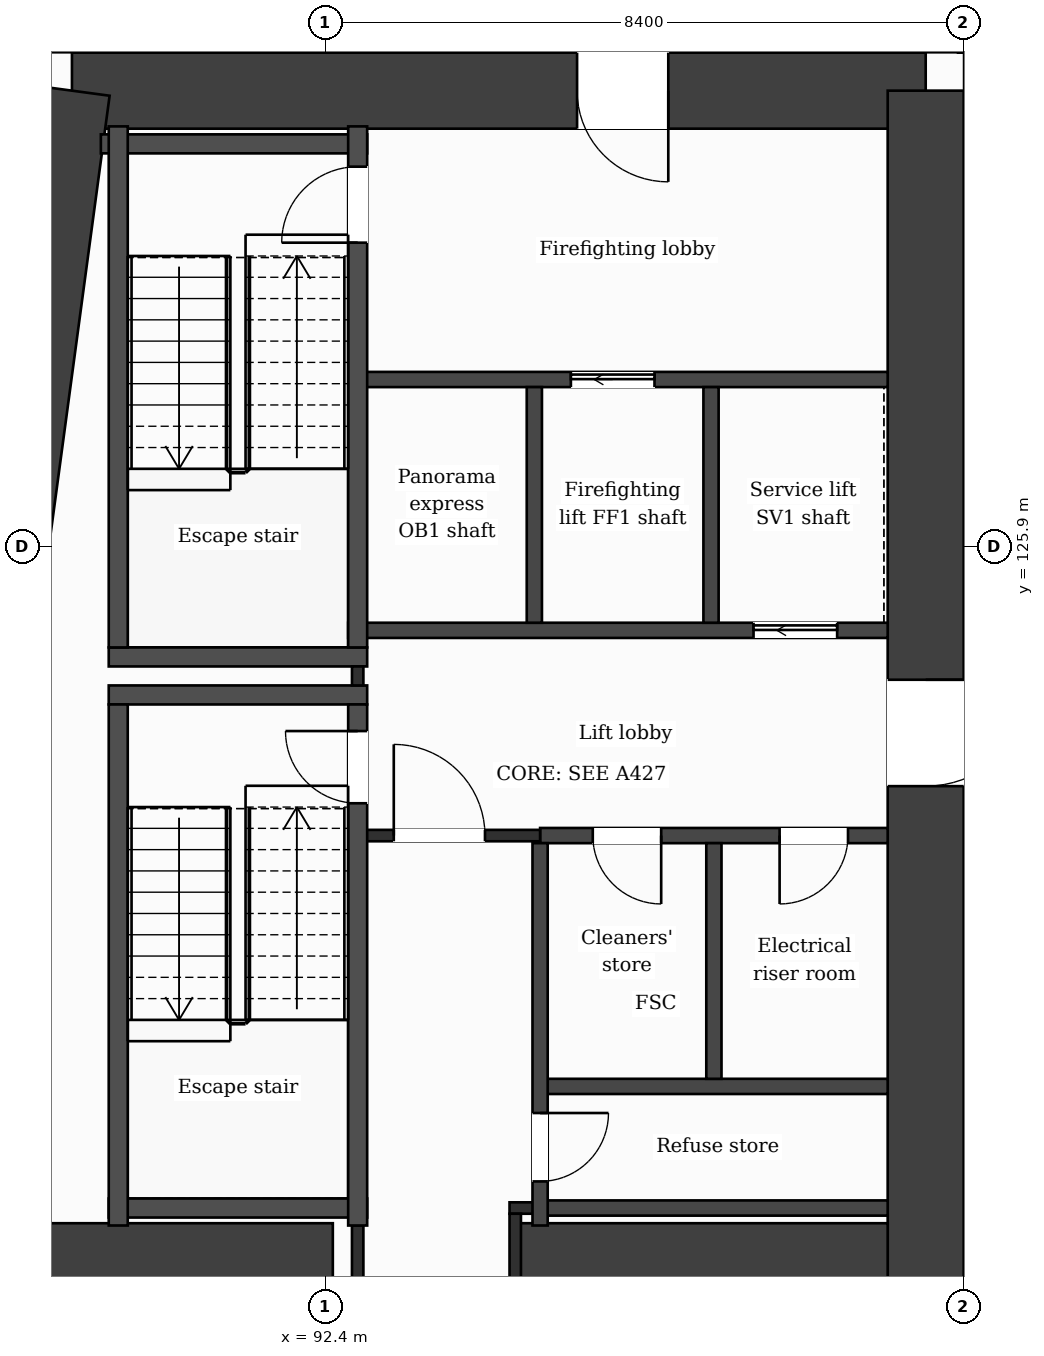
"""IFC4 building model, lengths in metres.
Left out: names, types, materials, properties, quantities, classifications, styles, units other than length and angle.
Written with IfcOpenShell. Run it as: python <this file> out.ifc"""

import sys

from ifc_helpers import new_model, si_unit, direction, frame, frame_2d, origin, place, context, subcontext, project, spatial, rectangle, extrude, element, fill, save


model = new_model("IFC4")
c1 = context("Model", 3, precision=1e-05, world=origin(), true_north=direction((0.0, 1.0)))
c2 = subcontext(c1, "Body", "Model", "MODEL_VIEW")
j1 = project(units=[si_unit("LENGTHUNIT", "METRE"), si_unit("PLANEANGLEUNIT", "RADIAN")], contexts=[c1])
p1 = place(None, origin())
s1 = spatial("IfcSite", under=j1, at=p1, CompositionType="ELEMENT")
p2 = place(p1, origin())
s2 = spatial("IfcBuilding", under=s1, at=p2, CompositionType="ELEMENT")
p3 = place(p2, frame((0.0, 0.0, 113.2)))
s3 = spatial("IfcBuildingStorey", under=s2, at=p3, CompositionType="ELEMENT", Elevation=113.2)
p4 = place(p3, frame((89.068, 131.9, 0.0), z_axis=(0.0, 0.0, 1.0), x_axis=(1.0, 0.0, 0.0)))
e1 = element("IfcWall", 1, at=p4, inside=s3, PredefinedType="SHEAR", context=c2, shape_type="SweptSolid", body=[
    extrude(rectangle(XDim=11.232, YDim=1.0, at=frame_2d((5.616, 0.0))), origin(), (0.0, 0.0, 1.0), 3.7),
])
p5 = place(p4, frame((6.646, 0.0, 0.0)))
e2 = element("IfcOpeningElement", 2, at=p5, cuts=e1, PredefinedType="OPENING", context=c2, shape_type="SweptSolid", body=[
    extrude(rectangle(XDim=1.2, YDim=2.1, at=frame_2d((0.6, 1.05))), frame((0.0, 0.51, 0.0), z_axis=(0.0, -1.0, 0.0), x_axis=(1.0, 0.0, 0.0)), (0.0, 0.0, 1.0), 1.02),
])
p6 = place(p3, frame((100.3, 131.9, 0.0), z_axis=(0.0, 0.0, 1.0), x_axis=(0.0, -1.0, 0.0)))
e3 = element("IfcWall", 3, at=p6, inside=s3, PredefinedType="SHEAR", context=c2, shape_type="SweptSolid", body=[
    extrude(rectangle(XDim=21.0, YDim=1.0, at=frame_2d((10.5, 0.0))), origin(), (0.0, 0.0, 1.0), 3.7),
])
p7 = place(p6, frame((7.75, 0.0, 0.0)))
e4 = element("IfcOpeningElement", 4, at=p7, cuts=e3, PredefinedType="OPENING", context=c2, shape_type="SweptSolid", body=[
    extrude(rectangle(XDim=1.4, YDim=2.1, at=frame_2d((0.7, 1.05))), frame((0.0, 0.51, 0.0), z_axis=(0.0, -1.0, 0.0), x_axis=(1.0, 0.0, 0.0)), (0.0, 0.0, 1.0), 1.02),
])
p8 = place(p3, frame((86.241, 110.9, 0.0), z_axis=(0.0, 0.0, 1.0), x_axis=(0.133411141623, 0.991060778808, 0.0)))
e5 = element("IfcWall", 5, at=p8, inside=s3, PredefinedType="SHEAR", context=c2, shape_type="SweptSolid", body=[
    extrude(rectangle(XDim=21.189, YDim=1.0, at=frame_2d((10.595, 0.0))), origin(), (0.0, 0.0, 1.0), 3.7),
])
p9 = place(p3, frame((87.423, 116.5, 0.0), z_axis=(0.0, 0.0, 1.0), x_axis=(1.0, 0.0, 0.0)))
e6 = element("IfcWall", 6, at=p9, inside=s3, PredefinedType="SHEAR", context=c2, shape_type="SweptSolid", body=[
    extrude(rectangle(XDim=5.077, YDim=1.0, at=frame_2d((2.539, 0.0))), origin(), (0.0, 0.0, 1.0), 3.7),
])
p10 = place(p3, frame((94.9, 116.5, 0.0), z_axis=(0.0, 0.0, 1.0), x_axis=(1.0, 0.0, 0.0)))
e7 = element("IfcWall", 7, at=p10, inside=s3, PredefinedType="SHEAR", context=c2, shape_type="SweptSolid", body=[
    extrude(rectangle(XDim=4.9, YDim=1.0, at=frame_2d((2.45, 0.0))), origin(), (0.0, 0.0, 1.0), 3.7),
])
p11 = place(p3, frame((91.177, 138.95, 0.0), z_axis=(0.0, 0.0, 1.0), x_axis=(-0.133426664613, -0.991058689065, 0.0)))
e8 = element("IfcWall", 8, at=p11, inside=s3, PredefinedType="SOLIDWALL", context=c2, shape_type="SweptSolid", body=[
    extrude(rectangle(XDim=6.609, YDim=0.3, at=frame_2d((3.305, 0.0))), origin(), (0.0, 0.0, 1.0), 3.38),
])
p12 = place(p11, frame((1.039, 0.0, 0.9)))
e9 = element("IfcOpeningElement", 9, at=p12, cuts=e8, PredefinedType="OPENING", context=c2, shape_type="SweptSolid", body=[
    extrude(rectangle(XDim=1.2, YDim=2.1, at=frame_2d((0.6, 1.05))), frame((0.0, 0.16, 0.0), z_axis=(0.0, -1.0, 0.0), x_axis=(1.0, 0.0, 0.0)), (0.0, 0.0, 1.0), 0.32),
])
p13 = place(p11, frame((4.294, 0.0, 0.0)))
e10 = element("IfcOpeningElement", 10, at=p13, cuts=e8, PredefinedType="OPENING", context=c2, shape_type="SweptSolid", body=[
    extrude(rectangle(XDim=1.2, YDim=2.4, at=frame_2d((0.6, 1.2))), frame((0.0, 0.16, 0.0), z_axis=(0.0, -1.0, 0.0), x_axis=(1.0, 0.0, 0.0)), (0.0, 0.0, 1.0), 0.32),
])
p14 = place(p3, frame((95.227, 117.2, 0.0), z_axis=(0.0, 0.0, 1.0), x_axis=(1.0, 0.0, 0.0)))
e11 = element("IfcWall", 11, at=p14, inside=s3, PredefinedType="PARTITIONING", context=c2, shape_type="SweptSolid", body=[
    extrude(rectangle(XDim=4.573, YDim=0.2, at=frame_2d((2.287, 0.0))), origin(), (0.0, 0.0, 1.0), 3.38),
])
p15 = place(p3, frame((94.825, 117.2, 0.0), z_axis=(0.0, 0.0, 1.0), x_axis=(1.0, 0.0, 0.0)))
e12 = element("IfcWall", 12, at=p15, inside=s3, PredefinedType="PARTITIONING", context=c2, shape_type="SweptSolid", body=[
    extrude(rectangle(XDim=0.402, YDim=0.15, at=frame_2d((0.201, 0.0))), origin(), (0.0, 0.0, 1.0), 3.38),
])
p16 = place(p3, frame((89.552, 117.2, 0.0), z_axis=(0.0, 0.0, 1.0), x_axis=(1.0, 0.0, 0.0)))
e13 = element("IfcWall", 13, at=p16, inside=s3, PredefinedType="PARTITIONING", context=c2, shape_type="SweptSolid", body=[
    extrude(rectangle(XDim=3.4, YDim=0.25, at=frame_2d((1.7, 0.0))), origin(), (0.0, 0.0, 1.0), 3.38),
])
p17 = place(p3, frame((95.227, 118.8, 0.0), z_axis=(0.0, 0.0, 1.0), x_axis=(1.0, 0.0, 0.0)))
e14 = element("IfcWall", 14, at=p17, inside=s3, PredefinedType="PARTITIONING", context=c2, shape_type="SweptSolid", body=[
    extrude(rectangle(XDim=4.573, YDim=0.2, at=frame_2d((2.287, 0.0))), origin(), (0.0, 0.0, 1.0), 3.38),
])
p18 = place(p3, frame((95.227, 122.1, 0.0), z_axis=(0.0, 0.0, 1.0), x_axis=(1.0, 0.0, 0.0)))
e15 = element("IfcWall", 15, at=p18, inside=s3, PredefinedType="PARTITIONING", context=c2, shape_type="SweptSolid", body=[
    extrude(rectangle(XDim=4.573, YDim=0.2, at=frame_2d((2.287, 0.0))), origin(), (0.0, 0.0, 1.0), 3.38),
])
p19 = place(p18, frame((0.693, 0.0, 0.0)))
e16 = element("IfcOpeningElement", 16, at=p19, cuts=e15, PredefinedType="OPENING", context=c2, shape_type="SweptSolid", body=[
    extrude(rectangle(XDim=0.9, YDim=2.1, at=frame_2d((0.45, 1.05))), frame((0.0, 0.11, 0.0), z_axis=(0.0, -1.0, 0.0), x_axis=(1.0, 0.0, 0.0)), (0.0, 0.0, 1.0), 0.22),
])
p20 = place(p18, frame((3.151, 0.0, 0.0)))
e17 = element("IfcOpeningElement", 17, at=p20, cuts=e15, PredefinedType="OPENING", context=c2, shape_type="SweptSolid", body=[
    extrude(rectangle(XDim=0.9, YDim=2.1, at=frame_2d((0.45, 1.05))), frame((0.0, 0.11, 0.0), z_axis=(0.0, -1.0, 0.0), x_axis=(1.0, 0.0, 0.0)), (0.0, 0.0, 1.0), 0.22),
])
p21 = place(p3, frame((92.827, 122.1, 0.0), z_axis=(0.0, 0.0, 1.0), x_axis=(1.0, 0.0, 0.0)))
e18 = element("IfcWall", 18, at=p21, inside=s3, PredefinedType="PARTITIONING", context=c2, shape_type="SweptSolid", body=[
    extrude(rectangle(XDim=2.4, YDim=0.15, at=frame_2d((1.2, 0.0))), origin(), (0.0, 0.0, 1.0), 3.38),
])
p22 = place(p21, frame((0.475, 0.0, 0.0)))
e19 = element("IfcOpeningElement", 19, at=p22, cuts=e18, PredefinedType="OPENING", context=c2, shape_type="SweptSolid", body=[
    extrude(rectangle(XDim=1.2, YDim=2.1, at=frame_2d((0.6, 1.05))), frame((0.0, 0.085, 0.0), z_axis=(0.0, -1.0, 0.0), x_axis=(1.0, 0.0, 0.0)), (0.0, 0.0, 1.0), 0.17),
])
for number, where, z_axis, x_axis in (
    (20, (89.552, 123.95, 0.0), (0.0, 0.0, 1.0), (1.0, 0.0, 0.0)),
    (21, (89.552, 124.45, 0.0), (0.0, 0.0, 1.0), (1.0, 0.0, 0.0)),
):
    element("IfcWall", number, at=place(p3, frame(where, z_axis=z_axis, x_axis=x_axis)), inside=s3, PredefinedType="PARTITIONING", context=c2, shape_type="SweptSolid", body=[
        extrude(rectangle(XDim=3.4, YDim=0.25, at=frame_2d((1.7, 0.0))), origin(), (0.0, 0.0, 1.0), 3.38),
    ])
p23 = place(p3, frame((92.702, 124.8, 0.0), z_axis=(0.0, 0.0, 1.0), x_axis=(1.0, 0.0, 0.0)))
e22 = element("IfcWall", 22, at=p23, inside=s3, PredefinedType="PARTITIONING", context=c2, shape_type="SweptSolid", body=[
    extrude(rectangle(XDim=7.098, YDim=0.2, at=frame_2d((3.549, 0.0))), origin(), (0.0, 0.0, 1.0), 3.38),
])
p24 = place(p23, frame((5.333, 0.0, 0.0)))
e23 = element("IfcOpeningElement", 23, at=p24, cuts=e22, PredefinedType="OPENING", context=c2, shape_type="SweptSolid", body=[
    extrude(rectangle(XDim=1.1, YDim=2.1, at=frame_2d((0.55, 1.05))), frame((0.0, 0.11, 0.0), z_axis=(0.0, -1.0, 0.0), x_axis=(1.0, 0.0, 0.0)), (0.0, 0.0, 1.0), 0.22),
])
p25 = place(p3, frame((92.827, 128.1, 0.0), z_axis=(0.0, 0.0, 1.0), x_axis=(1.0, 0.0, 0.0)))
e24 = element("IfcWall", 24, at=p25, inside=s3, PredefinedType="PARTITIONING", context=c2, shape_type="SweptSolid", body=[
    extrude(rectangle(XDim=6.973, YDim=0.2, at=frame_2d((3.487, 0.0))), origin(), (0.0, 0.0, 1.0), 3.38),
])
p26 = place(p25, frame((2.805, 0.0, 0.0)))
e25 = element("IfcOpeningElement", 25, at=p26, cuts=e24, PredefinedType="OPENING", context=c2, shape_type="SweptSolid", body=[
    extrude(rectangle(XDim=1.1, YDim=2.1, at=frame_2d((0.55, 1.05))), frame((0.0, 0.11, 0.0), z_axis=(0.0, -1.0, 0.0), x_axis=(1.0, 0.0, 0.0)), (0.0, 0.0, 1.0), 0.22),
])
p27 = place(p3, frame((89.448, 131.2, 0.0), z_axis=(0.0, 0.0, 1.0), x_axis=(1.0, 0.0, 0.0)))
e26 = element("IfcWall", 26, at=p27, inside=s3, PredefinedType="PARTITIONING", context=c2, shape_type="SweptSolid", body=[
    extrude(rectangle(XDim=3.504, YDim=0.25, at=frame_2d((1.752, 0.0))), origin(), (0.0, 0.0, 1.0), 3.38),
])
for number, where, z_axis, x_axis in (
    (27, (89.677, 116.97, 0.0), (0.0, 0.0, 1.0), (0.0, 1.0, 0.0)),
    (28, (89.677, 124.575, 0.0), (0.0, 0.0, 1.0), (0.0, 1.0, 0.0)),
):
    element("IfcWall", number, at=place(p3, frame(where, z_axis=z_axis, x_axis=x_axis)), inside=s3, PredefinedType="PARTITIONING", context=c2, shape_type="SweptSolid", body=[
        extrude(rectangle(XDim=6.855, YDim=0.25, at=frame_2d((3.427, 0.0))), origin(), (0.0, 0.0, 1.0), 3.38),
    ])
p28 = place(p3, frame((92.827, 116.0, 0.0), z_axis=(0.0, 0.0, 1.0), x_axis=(0.0, 1.0, 0.0)))
e29 = element("IfcWall", 29, at=p28, inside=s3, PredefinedType="PARTITIONING", context=c2, shape_type="SweptSolid", body=[
    extrude(rectangle(XDim=0.97, YDim=0.15, at=frame_2d((0.485, 0.0))), origin(), (0.0, 0.0, 1.0), 3.38),
])
p29 = place(p3, frame((92.827, 124.075, 0.0), z_axis=(0.0, 0.0, 1.0), x_axis=(0.0, 1.0, 0.0)))
e30 = element("IfcWall", 30, at=p29, inside=s3, PredefinedType="PARTITIONING", context=c2, shape_type="SweptSolid", body=[
    extrude(rectangle(XDim=0.25, YDim=0.15, at=frame_2d((0.125, 0.0))), origin(), (0.0, 0.0, 1.0), 3.38),
])
p30 = place(p3, frame((92.827, 116.97, 0.0), z_axis=(0.0, 0.0, 1.0), x_axis=(0.0, 1.0, 0.0)))
e31 = element("IfcWall", 31, at=p30, inside=s3, PredefinedType="PARTITIONING", context=c2, shape_type="SweptSolid", body=[
    extrude(rectangle(XDim=6.855, YDim=0.25, at=frame_2d((3.427, 0.0))), origin(), (0.0, 0.0, 1.0), 3.38),
])
p31 = place(p30, frame((5.555, 0.0, 0.0)))
e32 = element("IfcOpeningElement", 32, at=p31, cuts=e31, PredefinedType="OPENING", context=c2, shape_type="SweptSolid", body=[
    extrude(rectangle(XDim=0.95, YDim=2.1, at=frame_2d((0.475, 1.05))), frame((0.0, 0.135, 0.0), z_axis=(0.0, -1.0, 0.0), x_axis=(1.0, 0.0, 0.0)), (0.0, 0.0, 1.0), 0.27),
])
p32 = place(p3, frame((92.827, 124.575, 0.0), z_axis=(0.0, 0.0, 1.0), x_axis=(0.0, 1.0, 0.0)))
e33 = element("IfcWall", 33, at=p32, inside=s3, PredefinedType="PARTITIONING", context=c2, shape_type="SweptSolid", body=[
    extrude(rectangle(XDim=6.855, YDim=0.25, at=frame_2d((3.427, 0.0))), origin(), (0.0, 0.0, 1.0), 3.38),
])
p33 = place(p32, frame((5.325, 0.0, 0.0)))
e34 = element("IfcOpeningElement", 34, at=p33, cuts=e33, PredefinedType="OPENING", context=c2, shape_type="SweptSolid", body=[
    extrude(rectangle(XDim=1.0, YDim=2.1, at=frame_2d((0.5, 1.05))), frame((0.0, 0.135, 0.0), z_axis=(0.0, -1.0, 0.0), x_axis=(1.0, 0.0, 0.0)), (0.0, 0.0, 1.0), 0.27),
])
p34 = place(p3, frame((94.9, 116.0, 0.0), z_axis=(0.0, 0.0, 1.0), x_axis=(0.0, 1.0, 0.0)))
e35 = element("IfcWall", 35, at=p34, inside=s3, PredefinedType="PARTITIONING", context=c2, shape_type="SweptSolid", body=[
    extrude(rectangle(XDim=1.125, YDim=0.15, at=frame_2d((0.562, 0.0))), origin(), (0.0, 0.0, 1.0), 3.38),
])
p35 = place(p3, frame((95.151, 124.9, 0.0), z_axis=(0.0, 0.0, 1.0), x_axis=(0.0, 1.0, 0.0)))
e36 = element("IfcWall", 36, at=p35, inside=s3, PredefinedType="PARTITIONING", context=c2, shape_type="SweptSolid", body=[
    extrude(rectangle(XDim=3.1, YDim=0.2, at=frame_2d((1.55, 0.0))), origin(), (0.0, 0.0, 1.0), 3.38),
])
p36 = place(p3, frame((95.227, 116.97, 0.0), z_axis=(0.0, 0.0, 1.0), x_axis=(0.0, 1.0, 0.0)))
e37 = element("IfcWall", 37, at=p36, inside=s3, PredefinedType="PARTITIONING", context=c2, shape_type="SweptSolid", body=[
    extrude(rectangle(XDim=5.03, YDim=0.2, at=frame_2d((2.515, 0.0))), origin(), (0.0, 0.0, 1.0), 3.38),
])
p37 = place(p36, frame((0.58, 0.0, 0.0)))
e38 = element("IfcOpeningElement", 38, at=p37, cuts=e37, PredefinedType="OPENING", context=c2, shape_type="SweptSolid", body=[
    extrude(rectangle(XDim=0.9, YDim=2.1, at=frame_2d((0.45, 1.05))), frame((0.0, 0.11, 0.0), z_axis=(0.0, -1.0, 0.0), x_axis=(1.0, 0.0, 0.0)), (0.0, 0.0, 1.0), 0.22),
])
for number, where, z_axis, x_axis in (
    (39, (97.476, 124.9, 0.0), (0.0, 0.0, 1.0), (0.0, 1.0, 0.0)),
    (40, (97.513, 118.9, 0.0), (0.0, 0.0, 1.0), (0.0, 1.0, 0.0)),
):
    element("IfcWall", number, at=place(p3, frame(where, z_axis=z_axis, x_axis=x_axis)), inside=s3, PredefinedType="PARTITIONING", context=c2, shape_type="SweptSolid", body=[
        extrude(rectangle(XDim=3.1, YDim=0.2, at=frame_2d((1.55, 0.0))), origin(), (0.0, 0.0, 1.0), 3.38),
    ])
p38 = place(p22, origin())
e41 = element("IfcDoor", 41, at=p38, inside=s3, OperationType="SINGLE_SWING_LEFT", PredefinedType="DOOR", context=c2, shape_type="SweptSolid", body=[
    extrude(rectangle(XDim=1.2, YDim=2.1, at=frame_2d((0.6, 1.05))), frame((0.0, 0.025, 0.0), z_axis=(0.0, -1.0, 0.0), x_axis=(1.0, 0.0, 0.0)), (0.0, 0.0, 1.0), 0.05),
])
fill(e19, e41)
p39 = place(p26, origin())
e42 = element("IfcDoor", 42, at=p39, inside=s3, OperationType="SLIDING_TO_LEFT", PredefinedType="DOOR", context=c2, shape_type="SweptSolid", body=[
    extrude(rectangle(XDim=1.1, YDim=2.1, at=frame_2d((0.55, 1.05))), frame((0.0, 0.025, 0.0), z_axis=(0.0, -1.0, 0.0), x_axis=(1.0, 0.0, 0.0)), (0.0, 0.0, 1.0), 0.05),
])
fill(e25, e42)
p40 = place(p24, origin())
e43 = element("IfcDoor", 43, at=p40, inside=s3, OperationType="SLIDING_TO_LEFT", PredefinedType="DOOR", context=c2, shape_type="SweptSolid", body=[
    extrude(rectangle(XDim=1.1, YDim=2.1, at=frame_2d((0.55, 1.05))), frame((0.0, 0.025, 0.0), z_axis=(0.0, -1.0, 0.0), x_axis=(1.0, 0.0, 0.0)), (0.0, 0.0, 1.0), 0.05),
])
fill(e23, e43)
p41 = place(p19, origin())
e44 = element("IfcDoor", 44, at=p41, inside=s3, OperationType="SINGLE_SWING_RIGHT", PredefinedType="DOOR", context=c2, shape_type="SweptSolid", body=[
    extrude(rectangle(XDim=0.9, YDim=2.1, at=frame_2d((0.45, 1.05))), frame((0.0, 0.025, 0.0), z_axis=(0.0, -1.0, 0.0), x_axis=(1.0, 0.0, 0.0)), (0.0, 0.0, 1.0), 0.05),
])
fill(e16, e44)
p42 = place(p20, origin())
e45 = element("IfcDoor", 45, at=p42, inside=s3, OperationType="SINGLE_SWING_LEFT", PredefinedType="DOOR", context=c2, shape_type="SweptSolid", body=[
    extrude(rectangle(XDim=0.9, YDim=2.1, at=frame_2d((0.45, 1.05))), frame((0.0, 0.025, 0.0), z_axis=(0.0, -1.0, 0.0), x_axis=(1.0, 0.0, 0.0)), (0.0, 0.0, 1.0), 0.05),
])
fill(e17, e45)
p43 = place(p31, origin())
e46 = element("IfcDoor", 46, at=p43, inside=s3, OperationType="SINGLE_SWING_RIGHT", PredefinedType="DOOR", context=c2, shape_type="SweptSolid", body=[
    extrude(rectangle(XDim=0.95, YDim=2.1, at=frame_2d((0.475, 1.05))), frame((0.0, 0.025, 0.0), z_axis=(0.0, -1.0, 0.0), x_axis=(1.0, 0.0, 0.0)), (0.0, 0.0, 1.0), 0.05),
])
fill(e32, e46)
p44 = place(p33, origin())
e47 = element("IfcDoor", 47, at=p44, inside=s3, OperationType="SINGLE_SWING_LEFT", PredefinedType="DOOR", context=c2, shape_type="SweptSolid", body=[
    extrude(rectangle(XDim=1.0, YDim=2.1, at=frame_2d((0.5, 1.05))), frame((0.0, 0.025, 0.0), z_axis=(0.0, -1.0, 0.0), x_axis=(1.0, 0.0, 0.0)), (0.0, 0.0, 1.0), 0.05),
])
fill(e34, e47)
p45 = place(p37, origin())
e48 = element("IfcDoor", 48, at=p45, inside=s3, OperationType="SINGLE_SWING_RIGHT", PredefinedType="DOOR", context=c2, shape_type="SweptSolid", body=[
    extrude(rectangle(XDim=0.9, YDim=2.1, at=frame_2d((0.45, 1.05))), frame((0.0, 0.025, 0.0), z_axis=(0.0, -1.0, 0.0), x_axis=(1.0, 0.0, 0.0)), (0.0, 0.0, 1.0), 0.05),
])
fill(e38, e48)
p46 = place(p5, origin())
e49 = element("IfcDoor", 49, at=p46, inside=s3, OperationType="SINGLE_SWING_RIGHT", PredefinedType="DOOR", context=c2, shape_type="SweptSolid", body=[
    extrude(rectangle(XDim=1.2, YDim=2.1, at=frame_2d((0.6, 1.05))), frame((0.0, 0.025, 0.0), z_axis=(0.0, -1.0, 0.0), x_axis=(1.0, 0.0, 0.0)), (0.0, 0.0, 1.0), 0.05),
])
fill(e2, e49)
p47 = place(p7, origin())
e50 = element("IfcDoor", 50, at=p47, inside=s3, OperationType="SINGLE_SWING_LEFT", PredefinedType="DOOR", context=c2, shape_type="SweptSolid", body=[
    extrude(rectangle(XDim=1.4, YDim=2.1, at=frame_2d((0.7, 1.05))), frame((0.0, 0.025, 0.0), z_axis=(0.0, -1.0, 0.0), x_axis=(1.0, 0.0, 0.0)), (0.0, 0.0, 1.0), 0.05),
])
fill(e4, e50)
save(model, sys.argv[1])
